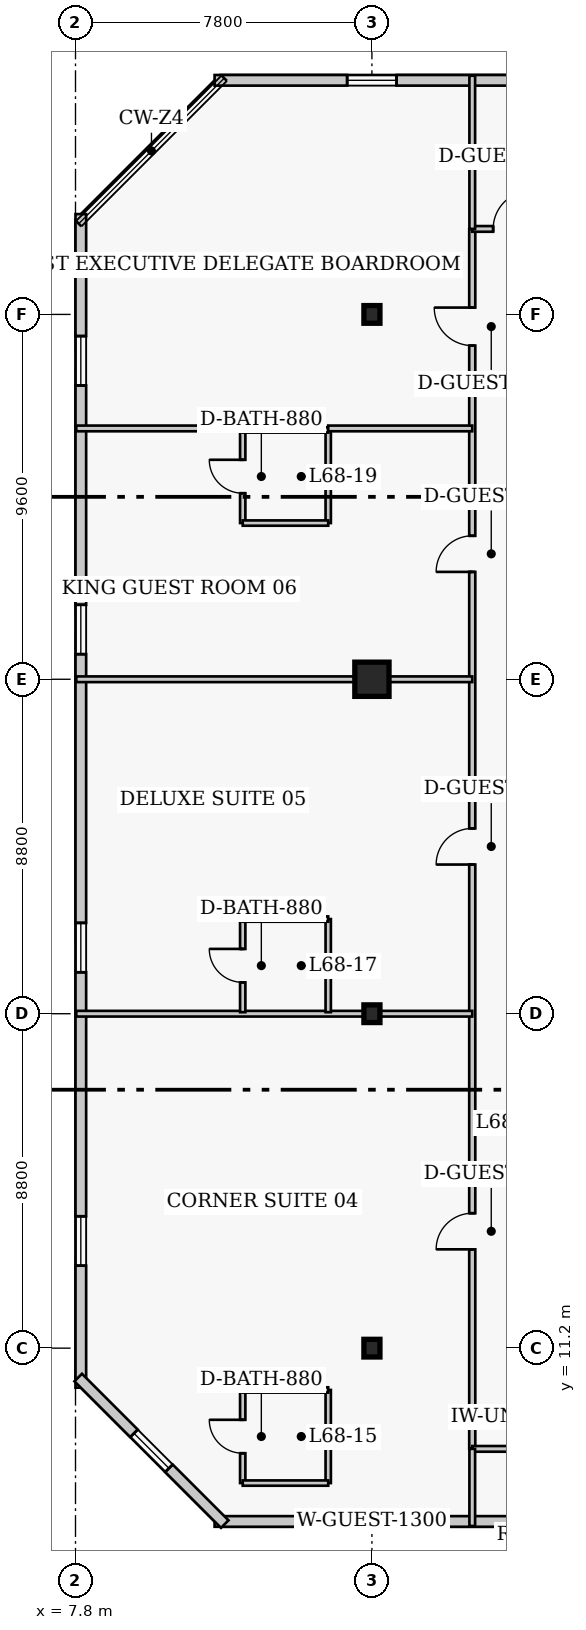
"""IFC4 building model, lengths in metres.
Left out: names, types, materials, properties, quantities, classifications, styles, units other than length and angle.
Written with IfcOpenShell. Run it as: python <this file> out.ifc"""

import sys

from ifc_helpers import new_model, si_unit, direction, frame, frame_2d, origin, origin_2d, place, context, subcontext, project, spatial, rectangle, i_section, extrude, element, fill, save


model = new_model("IFC4")
c1 = context("Model", 3, precision=1e-05, world=origin(), true_north=direction((0.0, 1.0)))
c2 = subcontext(c1, "Body", "Model", "MODEL_VIEW")
j1 = project(units=[si_unit("LENGTHUNIT", "METRE"), si_unit("PLANEANGLEUNIT", "RADIAN")], contexts=[c1])
p1 = place(None, origin())
s1 = spatial("IfcSite", under=j1, at=p1, CompositionType="ELEMENT")
p2 = place(p1, origin())
s2 = spatial("IfcBuilding", under=s1, at=p2, CompositionType="ELEMENT")
p3 = place(p2, frame((0.0, 0.0, 273.4)))
s3 = spatial("IfcBuildingStorey", under=s2, at=p3, CompositionType="ELEMENT", Elevation=273.4)
for number, where, z_axis, x_axis in (
    (1, (15.6, 11.2, 0.0), (0.0, 0.0, 1.0), (1.0, 0.0, 0.0)),
    (2, (15.6, 20.0, 0.0), (0.0, 0.0, 1.0), (1.0, 0.0, 0.0)),
):
    element("IfcColumn", number, at=place(p3, frame(where, z_axis=z_axis, x_axis=x_axis)), inside=s3, PredefinedType="COLUMN", context=c2, shape_type="SweptSolid", body=[
        extrude(i_section(OverallWidth=0.422, OverallDepth=0.465, WebThickness=0.045, FlangeThickness=0.073, FilletRadius=0.017, at=origin_2d()), origin(), (0.0, 0.0, 1.0), 4.0),
    ])
p4 = place(p3, frame((15.6, 28.8, 0.0), z_axis=(0.0, 0.0, 1.0), x_axis=(1.0, 0.0, 0.0)))
e3 = element("IfcColumn", 3, at=p4, inside=s3, PredefinedType="COLUMN", context=c2, shape_type="SweptSolid", body=[
    extrude(rectangle(XDim=0.9, YDim=0.9, at=origin_2d()), origin(), (0.0, 0.0, 1.0), 4.0),
])
p5 = place(p3, frame((15.6, 38.4, 0.0), z_axis=(0.0, 0.0, 1.0), x_axis=(1.0, 0.0, 0.0)))
e4 = element("IfcColumn", 4, at=p5, inside=s3, PredefinedType="COLUMN", context=c2, shape_type="SweptSolid", body=[
    extrude(i_section(OverallWidth=0.422, OverallDepth=0.465, WebThickness=0.045, FlangeThickness=0.073, FilletRadius=0.017, at=origin_2d()), origin(), (0.0, 0.0, 1.0), 4.0),
])
p6 = place(p3, frame((11.46, 6.64, 0.0), z_axis=(0.0, 0.0, 1.0), x_axis=(1.0, 0.0, 0.0)))
e5 = element("IfcWall", 5, at=p6, inside=s3, PredefinedType="SOLIDWALL", context=c2, shape_type="SweptSolid", body=[
    extrude(rectangle(XDim=24.83, YDim=0.28, at=frame_2d((12.415, 0.0))), origin(), (0.0, 0.0, 1.0), 3.76),
])
p7 = place(p6, frame((15.14, 0.0, 0.0)))
e6 = element("IfcOpeningElement", 6, at=p7, cuts=e5, PredefinedType="OPENING", context=c2, shape_type="SweptSolid", body=[
    extrude(rectangle(XDim=1.4, YDim=2.15, at=frame_2d((0.7, 1.075))), frame((0.0, 0.15, 0.0), z_axis=(0.0, -1.0, 0.0), x_axis=(1.0, 0.0, 0.0)), (0.0, 0.0, 1.0), 0.3),
])
p8 = place(p6, frame((3.488, 0.0, 0.85)))
e7 = element("IfcOpeningElement", 7, at=p8, cuts=e5, PredefinedType="OPENING", context=c2, shape_type="SweptSolid", body=[
    extrude(rectangle(XDim=1.3, YDim=1.7, at=frame_2d((0.65, 0.85))), frame((0.0, 0.15, 0.0), z_axis=(0.0, -1.0, 0.0), x_axis=(1.0, 0.0, 0.0)), (0.0, 0.0, 1.0), 0.3),
])
p9 = place(p6, frame((12.915, 0.0, 0.85)))
e8 = element("IfcOpeningElement", 8, at=p9, cuts=e5, PredefinedType="OPENING", context=c2, shape_type="SweptSolid", body=[
    extrude(rectangle(XDim=1.3, YDim=1.7, at=frame_2d((0.65, 0.85))), frame((0.0, 0.15, 0.0), z_axis=(0.0, -1.0, 0.0), x_axis=(1.0, 0.0, 0.0)), (0.0, 0.0, 1.0), 0.3),
])
p10 = place(p6, frame((20.692, 0.0, 0.85)))
e9 = element("IfcOpeningElement", 9, at=p10, cuts=e5, PredefinedType="OPENING", context=c2, shape_type="SweptSolid", body=[
    extrude(rectangle(XDim=1.3, YDim=1.7, at=frame_2d((0.65, 0.85))), frame((0.0, 0.15, 0.0), z_axis=(0.0, -1.0, 0.0), x_axis=(1.0, 0.0, 0.0)), (0.0, 0.0, 1.0), 0.3),
])
p11 = place(p3, frame((36.29, 44.56, 0.0), z_axis=(0.0, 0.0, 1.0), x_axis=(-1.0, 0.0, 0.0)))
e10 = element("IfcWall", 10, at=p11, inside=s3, PredefinedType="SOLIDWALL", context=c2, shape_type="SweptSolid", body=[
    extrude(rectangle(XDim=24.83, YDim=0.28, at=frame_2d((12.415, 0.0))), origin(), (0.0, 0.0, 1.0), 3.76),
])
p12 = place(p11, frame((3.488, 0.0, 0.85)))
e11 = element("IfcOpeningElement", 11, at=p12, cuts=e10, PredefinedType="OPENING", context=c2, shape_type="SweptSolid", body=[
    extrude(rectangle(XDim=1.3, YDim=1.7, at=frame_2d((0.65, 0.85))), frame((0.0, 0.15, 0.0), z_axis=(0.0, -1.0, 0.0), x_axis=(1.0, 0.0, 0.0)), (0.0, 0.0, 1.0), 0.3),
])
p13 = place(p11, frame((11.765, 0.0, 0.85)))
e12 = element("IfcOpeningElement", 12, at=p13, cuts=e10, PredefinedType="OPENING", context=c2, shape_type="SweptSolid", body=[
    extrude(rectangle(XDim=1.3, YDim=1.7, at=frame_2d((0.65, 0.85))), frame((0.0, 0.15, 0.0), z_axis=(0.0, -1.0, 0.0), x_axis=(1.0, 0.0, 0.0)), (0.0, 0.0, 1.0), 0.3),
])
p14 = place(p11, frame((20.042, 0.0, 0.85)))
e13 = element("IfcOpeningElement", 13, at=p14, cuts=e10, PredefinedType="OPENING", context=c2, shape_type="SweptSolid", body=[
    extrude(rectangle(XDim=1.3, YDim=1.7, at=frame_2d((0.65, 0.85))), frame((0.0, 0.15, 0.0), z_axis=(0.0, -1.0, 0.0), x_axis=(1.0, 0.0, 0.0)), (0.0, 0.0, 1.0), 0.3),
])
p15 = place(p3, frame((7.94, 41.04, 0.0), z_axis=(0.0, 0.0, 1.0), x_axis=(0.0, -1.0, 0.0)))
e14 = element("IfcWall", 14, at=p15, inside=s3, PredefinedType="SOLIDWALL", context=c2, shape_type="SweptSolid", body=[
    extrude(rectangle(XDim=30.88, YDim=0.28, at=frame_2d((15.44, 0.0))), origin(), (0.0, 0.0, 1.0), 3.76),
])
p16 = place(p15, frame((3.21, 0.0, 0.85)))
e15 = element("IfcOpeningElement", 15, at=p16, cuts=e14, PredefinedType="OPENING", context=c2, shape_type="SweptSolid", body=[
    extrude(rectangle(XDim=1.3, YDim=1.7, at=frame_2d((0.65, 0.85))), frame((0.0, 0.15, 0.0), z_axis=(0.0, -1.0, 0.0), x_axis=(1.0, 0.0, 0.0)), (0.0, 0.0, 1.0), 0.3),
])
p17 = place(p15, frame((10.28, 0.0, 0.85)))
e16 = element("IfcOpeningElement", 16, at=p17, cuts=e14, PredefinedType="OPENING", context=c2, shape_type="SweptSolid", body=[
    extrude(rectangle(XDim=1.3, YDim=1.7, at=frame_2d((0.65, 0.85))), frame((0.0, 0.15, 0.0), z_axis=(0.0, -1.0, 0.0), x_axis=(1.0, 0.0, 0.0)), (0.0, 0.0, 1.0), 0.3),
])
p18 = place(p15, frame((18.65, 0.0, 0.85)))
e17 = element("IfcOpeningElement", 17, at=p18, cuts=e14, PredefinedType="OPENING", context=c2, shape_type="SweptSolid", body=[
    extrude(rectangle(XDim=1.3, YDim=1.7, at=frame_2d((0.65, 0.85))), frame((0.0, 0.15, 0.0), z_axis=(0.0, -1.0, 0.0), x_axis=(1.0, 0.0, 0.0)), (0.0, 0.0, 1.0), 0.3),
])
p19 = place(p15, frame((26.37, 0.0, 0.85)))
e18 = element("IfcOpeningElement", 18, at=p19, cuts=e14, PredefinedType="OPENING", context=c2, shape_type="SweptSolid", body=[
    extrude(rectangle(XDim=1.3, YDim=1.7, at=frame_2d((0.65, 0.85))), frame((0.0, 0.15, 0.0), z_axis=(0.0, -1.0, 0.0), x_axis=(1.0, 0.0, 0.0)), (0.0, 0.0, 1.0), 0.3),
])
p20 = place(p3, frame((7.871, 10.427, 0.0), z_axis=(0.0, 0.0, 1.0), x_axis=(0.707129162587, -0.707084399077, 0.0)))
e19 = element("IfcWall", 19, at=p20, inside=s3, PredefinedType="SOLIDWALL", context=c2, shape_type="SweptSolid", body=[
    extrude(rectangle(XDim=5.454, YDim=0.28, at=frame_2d((2.727, 0.0))), origin(), (0.0, 0.0, 1.0), 3.76),
])
p21 = place(p20, frame((2.077, 0.0, 0.85)))
e20 = element("IfcOpeningElement", 20, at=p21, cuts=e19, PredefinedType="OPENING", context=c2, shape_type="SweptSolid", body=[
    extrude(rectangle(XDim=1.3, YDim=1.7, at=frame_2d((0.65, 0.85))), frame((0.0, 0.15, 0.0), z_axis=(0.0, -1.0, 0.0), x_axis=(1.0, 0.0, 0.0)), (0.0, 0.0, 1.0), 0.3),
])
p22 = place(p3, frame((18.24, 8.55, 0.0), z_axis=(0.0, 0.0, 1.0), x_axis=(0.0, 1.0, 0.0)))
e21 = element("IfcWall", 21, at=p22, inside=s3, PredefinedType="PARTITIONING", context=c2, shape_type="SweptSolid", body=[
    extrude(rectangle(XDim=32.1, YDim=0.16, at=frame_2d((16.05, 0.0))), origin(), (0.0, 0.0, 1.0), 3.76),
])
p23 = place(p22, frame((5.25, 0.0, 0.0)))
e22 = element("IfcOpeningElement", 22, at=p23, cuts=e21, PredefinedType="OPENING", context=c2, shape_type="SweptSolid", body=[
    extrude(rectangle(XDim=0.95, YDim=2.1, at=frame_2d((0.475, 1.05))), frame((0.0, 0.09, 0.0), z_axis=(0.0, -1.0, 0.0), x_axis=(1.0, 0.0, 0.0)), (0.0, 0.0, 1.0), 0.18),
])
p24 = place(p22, frame((15.375, 0.0, 0.0)))
e23 = element("IfcOpeningElement", 23, at=p24, cuts=e21, PredefinedType="OPENING", context=c2, shape_type="SweptSolid", body=[
    extrude(rectangle(XDim=0.95, YDim=2.1, at=frame_2d((0.475, 1.05))), frame((0.0, 0.09, 0.0), z_axis=(0.0, -1.0, 0.0), x_axis=(1.0, 0.0, 0.0)), (0.0, 0.0, 1.0), 0.18),
])
p25 = place(p22, frame((23.075, 0.0, 0.0)))
e24 = element("IfcOpeningElement", 24, at=p25, cuts=e21, PredefinedType="OPENING", context=c2, shape_type="SweptSolid", body=[
    extrude(rectangle(XDim=0.95, YDim=2.1, at=frame_2d((0.475, 1.05))), frame((0.0, 0.09, 0.0), z_axis=(0.0, -1.0, 0.0), x_axis=(1.0, 0.0, 0.0)), (0.0, 0.0, 1.0), 0.18),
])
p26 = place(p22, frame((29.03, 0.0, 0.0)))
e25 = element("IfcOpeningElement", 25, at=p26, cuts=e21, PredefinedType="OPENING", context=c2, shape_type="SweptSolid", body=[
    extrude(rectangle(XDim=1.0, YDim=2.15, at=frame_2d((0.5, 1.075))), frame((0.0, 0.09, 0.0), z_axis=(0.0, -1.0, 0.0), x_axis=(1.0, 0.0, 0.0)), (0.0, 0.0, 1.0), 0.18),
])
p27 = place(p3, frame((18.24, 8.55, 0.0), z_axis=(0.0, 0.0, 1.0), x_axis=(1.0, 0.0, 0.0)))
e26 = element("IfcWall", 26, at=p27, inside=s3, PredefinedType="PARTITIONING", context=c2, shape_type="SweptSolid", body=[
    extrude(rectangle(XDim=2.22, YDim=0.15, at=frame_2d((1.11, 0.0))), origin(), (0.0, 0.0, 1.0), 3.76),
])
p28 = place(p3, frame((18.24, 40.65, 0.0), z_axis=(0.0, 0.0, 1.0), x_axis=(1.0, 0.0, 0.0)))
e27 = element("IfcWall", 27, at=p28, inside=s3, PredefinedType="PARTITIONING", context=c2, shape_type="SweptSolid", body=[
    extrude(rectangle(XDim=3.86, YDim=0.15, at=frame_2d((1.93, 0.0))), origin(), (0.0, 0.0, 1.0), 3.76),
])
p29 = place(p28, frame((0.55, 0.0, 0.0)))
e28 = element("IfcOpeningElement", 28, at=p29, cuts=e27, PredefinedType="OPENING", context=c2, shape_type="SweptSolid", body=[
    extrude(rectangle(XDim=1.0, YDim=2.15, at=frame_2d((0.5, 1.075))), frame((0.0, 0.085, 0.0), z_axis=(0.0, -1.0, 0.0), x_axis=(1.0, 0.0, 0.0)), (0.0, 0.0, 1.0), 0.17),
])
p30 = place(p3, frame((18.24, 40.65, 0.0), z_axis=(0.0, 0.0, 1.0), x_axis=(0.0, 1.0, 0.0)))
e29 = element("IfcWall", 29, at=p30, inside=s3, PredefinedType="PARTITIONING", context=c2, shape_type="SweptSolid", body=[
    extrude(rectangle(XDim=4.03, YDim=0.15, at=frame_2d((2.015, 0.0))), origin(), (0.0, 0.0, 1.0), 3.76),
])
p31 = place(p3, frame((18.24, 6.52, 0.0), z_axis=(0.0, 0.0, 1.0), x_axis=(0.0, 1.0, 0.0)))
e30 = element("IfcWall", 30, at=p31, inside=s3, PredefinedType="PARTITIONING", context=c2, shape_type="SweptSolid", body=[
    extrude(rectangle(XDim=2.03, YDim=0.15, at=frame_2d((1.015, 0.0))), origin(), (0.0, 0.0, 1.0), 3.76),
])
p32 = place(p3, frame((12.2, 7.65, 0.0), z_axis=(0.0, 0.0, 1.0), x_axis=(0.0, 1.0, 0.0)))
e31 = element("IfcWall", 31, at=p32, inside=s3, PredefinedType="PLUMBINGWALL", context=c2, shape_type="SweptSolid", body=[
    extrude(rectangle(XDim=2.45, YDim=0.14, at=frame_2d((1.225, 0.0))), origin(), (0.0, 0.0, 1.0), 3.76),
])
p33 = place(p32, frame((0.785, 0.0, 0.0)))
e32 = element("IfcOpeningElement", 32, at=p33, cuts=e31, PredefinedType="OPENING", context=c2, shape_type="SweptSolid", body=[
    extrude(rectangle(XDim=0.88, YDim=2.05, at=frame_2d((0.44, 1.025))), frame((0.0, 0.08, 0.0), z_axis=(0.0, -1.0, 0.0), x_axis=(1.0, 0.0, 0.0)), (0.0, 0.0, 1.0), 0.16),
])
p34 = place(p3, frame((14.45, 7.65, 0.0), z_axis=(0.0, 0.0, 1.0), x_axis=(0.0, 1.0, 0.0)))
e33 = element("IfcWall", 33, at=p34, inside=s3, PredefinedType="PLUMBINGWALL", context=c2, shape_type="SweptSolid", body=[
    extrude(rectangle(XDim=2.45, YDim=0.14, at=frame_2d((1.225, 0.0))), origin(), (0.0, 0.0, 1.0), 3.76),
])
for number, where, z_axis, x_axis in (
    (34, (12.2, 7.65, 0.0), (0.0, 0.0, 1.0), (1.0, 0.0, 0.0)),
    (35, (12.2, 10.1, 0.0), (0.0, 0.0, 1.0), (1.0, 0.0, 0.0)),
):
    element("IfcWall", number, at=place(p3, frame(where, z_axis=z_axis, x_axis=x_axis)), inside=s3, PredefinedType="PLUMBINGWALL", context=c2, shape_type="SweptSolid", body=[
        extrude(rectangle(XDim=2.25, YDim=0.14, at=frame_2d((1.125, 0.0))), origin(), (0.0, 0.0, 1.0), 3.76),
    ])
p35 = place(p3, frame((7.82, 20.0, 0.0), z_axis=(0.0, 0.0, 1.0), x_axis=(1.0, 0.0, 0.0)))
e36 = element("IfcWall", 36, at=p35, inside=s3, PredefinedType="PARTITIONING", context=c2, shape_type="SweptSolid", body=[
    extrude(rectangle(XDim=10.42, YDim=0.15, at=frame_2d((5.21, 0.0))), origin(), (0.0, 0.0, 1.0), 3.064),
])
p36 = place(p3, frame((12.2, 20.04, 0.0), z_axis=(0.0, 0.0, 1.0), x_axis=(0.0, 1.0, 0.0)))
e37 = element("IfcWall", 37, at=p36, inside=s3, PredefinedType="PLUMBINGWALL", context=c2, shape_type="SweptSolid", body=[
    extrude(rectangle(XDim=2.45, YDim=0.14, at=frame_2d((1.225, 0.0))), origin(), (0.0, 0.0, 1.0), 3.76),
])
p37 = place(p36, frame((0.785, 0.0, 0.0)))
e38 = element("IfcOpeningElement", 38, at=p37, cuts=e37, PredefinedType="OPENING", context=c2, shape_type="SweptSolid", body=[
    extrude(rectangle(XDim=0.88, YDim=2.05, at=frame_2d((0.44, 1.025))), frame((0.0, 0.08, 0.0), z_axis=(0.0, -1.0, 0.0), x_axis=(1.0, 0.0, 0.0)), (0.0, 0.0, 1.0), 0.16),
])
p38 = place(p3, frame((14.45, 20.04, 0.0), z_axis=(0.0, 0.0, 1.0), x_axis=(0.0, 1.0, 0.0)))
e39 = element("IfcWall", 39, at=p38, inside=s3, PredefinedType="PLUMBINGWALL", context=c2, shape_type="SweptSolid", body=[
    extrude(rectangle(XDim=2.45, YDim=0.14, at=frame_2d((1.225, 0.0))), origin(), (0.0, 0.0, 1.0), 3.76),
])
p39 = place(p3, frame((12.2, 22.49, 0.0), z_axis=(0.0, 0.0, 1.0), x_axis=(1.0, 0.0, 0.0)))
e40 = element("IfcWall", 40, at=p39, inside=s3, PredefinedType="PLUMBINGWALL", context=c2, shape_type="SweptSolid", body=[
    extrude(rectangle(XDim=2.25, YDim=0.14, at=frame_2d((1.125, 0.0))), origin(), (0.0, 0.0, 1.0), 3.76),
])
p40 = place(p3, frame((7.82, 28.8, 0.0), z_axis=(0.0, 0.0, 1.0), x_axis=(1.0, 0.0, 0.0)))
e41 = element("IfcWall", 41, at=p40, inside=s3, PredefinedType="PARTITIONING", context=c2, shape_type="SweptSolid", body=[
    extrude(rectangle(XDim=10.42, YDim=0.15, at=frame_2d((5.21, 0.0))), origin(), (0.0, 0.0, 1.0), 3.064),
])
p41 = place(p3, frame((12.2, 32.91, 0.0), z_axis=(0.0, 0.0, 1.0), x_axis=(0.0, 1.0, 0.0)))
e42 = element("IfcWall", 42, at=p41, inside=s3, PredefinedType="PLUMBINGWALL", context=c2, shape_type="SweptSolid", body=[
    extrude(rectangle(XDim=2.45, YDim=0.14, at=frame_2d((1.225, 0.0))), origin(), (0.0, 0.0, 1.0), 3.76),
])
p42 = place(p41, frame((0.785, 0.0, 0.0)))
e43 = element("IfcOpeningElement", 43, at=p42, cuts=e42, PredefinedType="OPENING", context=c2, shape_type="SweptSolid", body=[
    extrude(rectangle(XDim=0.88, YDim=2.05, at=frame_2d((0.44, 1.025))), frame((0.0, 0.08, 0.0), z_axis=(0.0, -1.0, 0.0), x_axis=(1.0, 0.0, 0.0)), (0.0, 0.0, 1.0), 0.16),
])
p43 = place(p3, frame((14.45, 32.91, 0.0), z_axis=(0.0, 0.0, 1.0), x_axis=(0.0, 1.0, 0.0)))
e44 = element("IfcWall", 44, at=p43, inside=s3, PredefinedType="PLUMBINGWALL", context=c2, shape_type="SweptSolid", body=[
    extrude(rectangle(XDim=2.45, YDim=0.14, at=frame_2d((1.225, 0.0))), origin(), (0.0, 0.0, 1.0), 3.76),
])
for number, where, z_axis, x_axis in (
    (45, (12.2, 32.91, 0.0), (0.0, 0.0, 1.0), (1.0, 0.0, 0.0)),
    (46, (12.2, 35.36, 0.0), (0.0, 0.0, 1.0), (1.0, 0.0, 0.0)),
):
    element("IfcWall", number, at=place(p3, frame(where, z_axis=z_axis, x_axis=x_axis)), inside=s3, PredefinedType="PLUMBINGWALL", context=c2, shape_type="SweptSolid", body=[
        extrude(rectangle(XDim=2.25, YDim=0.14, at=frame_2d((1.125, 0.0))), origin(), (0.0, 0.0, 1.0), 3.76),
    ])
p44 = place(p3, frame((7.82, 35.4, 0.0), z_axis=(0.0, 0.0, 1.0), x_axis=(1.0, 0.0, 0.0)))
e47 = element("IfcWall", 47, at=p44, inside=s3, PredefinedType="PARTITIONING", context=c2, shape_type="SweptSolid", body=[
    extrude(rectangle(XDim=4.38, YDim=0.15, at=frame_2d((2.19, 0.0))), origin(), (0.0, 0.0, 1.0), 3.76),
])
p45 = place(p3, frame((14.45, 35.4, 0.0), z_axis=(0.0, 0.0, 1.0), x_axis=(1.0, 0.0, 0.0)))
e48 = element("IfcWall", 48, at=p45, inside=s3, PredefinedType="PARTITIONING", context=c2, shape_type="SweptSolid", body=[
    extrude(rectangle(XDim=3.79, YDim=0.15, at=frame_2d((1.895, 0.0))), origin(), (0.0, 0.0, 1.0), 3.76),
])
p46 = place(p8, origin())
e49 = element("IfcWindow", 49, at=p46, inside=s3, PartitioningType="SINGLE_PANEL", PredefinedType="WINDOW", context=c2, shape_type="SweptSolid", body=[
    extrude(rectangle(XDim=1.3, YDim=1.7, at=frame_2d((0.65, 0.85))), frame((0.0, 0.03, 0.0), z_axis=(0.0, -1.0, 0.0), x_axis=(1.0, 0.0, 0.0)), (0.0, 0.0, 1.0), 0.06),
])
fill(e7, e49)
p47 = place(p14, origin())
e50 = element("IfcWindow", 50, at=p47, inside=s3, PartitioningType="SINGLE_PANEL", PredefinedType="WINDOW", context=c2, shape_type="SweptSolid", body=[
    extrude(rectangle(XDim=1.3, YDim=1.7, at=frame_2d((0.65, 0.85))), frame((0.0, 0.03, 0.0), z_axis=(0.0, -1.0, 0.0), x_axis=(1.0, 0.0, 0.0)), (0.0, 0.0, 1.0), 0.06),
])
fill(e13, e50)
p48 = place(p16, origin())
e51 = element("IfcWindow", 51, at=p48, inside=s3, PartitioningType="SINGLE_PANEL", PredefinedType="WINDOW", context=c2, shape_type="SweptSolid", body=[
    extrude(rectangle(XDim=1.3, YDim=1.7, at=frame_2d((0.65, 0.85))), frame((0.0, 0.03, 0.0), z_axis=(0.0, -1.0, 0.0), x_axis=(1.0, 0.0, 0.0)), (0.0, 0.0, 1.0), 0.06),
])
fill(e15, e51)
p49 = place(p17, origin())
e52 = element("IfcWindow", 52, at=p49, inside=s3, PartitioningType="SINGLE_PANEL", PredefinedType="WINDOW", context=c2, shape_type="SweptSolid", body=[
    extrude(rectangle(XDim=1.3, YDim=1.7, at=frame_2d((0.65, 0.85))), frame((0.0, 0.03, 0.0), z_axis=(0.0, -1.0, 0.0), x_axis=(1.0, 0.0, 0.0)), (0.0, 0.0, 1.0), 0.06),
])
fill(e16, e52)
p50 = place(p18, origin())
e53 = element("IfcWindow", 53, at=p50, inside=s3, PartitioningType="SINGLE_PANEL", PredefinedType="WINDOW", context=c2, shape_type="SweptSolid", body=[
    extrude(rectangle(XDim=1.3, YDim=1.7, at=frame_2d((0.65, 0.85))), frame((0.0, 0.03, 0.0), z_axis=(0.0, -1.0, 0.0), x_axis=(1.0, 0.0, 0.0)), (0.0, 0.0, 1.0), 0.06),
])
fill(e17, e53)
p51 = place(p19, origin())
e54 = element("IfcWindow", 54, at=p51, inside=s3, PartitioningType="SINGLE_PANEL", PredefinedType="WINDOW", context=c2, shape_type="SweptSolid", body=[
    extrude(rectangle(XDim=1.3, YDim=1.7, at=frame_2d((0.65, 0.85))), frame((0.0, 0.03, 0.0), z_axis=(0.0, -1.0, 0.0), x_axis=(1.0, 0.0, 0.0)), (0.0, 0.0, 1.0), 0.06),
])
fill(e18, e54)
p52 = place(p21, origin())
e55 = element("IfcWindow", 55, at=p52, inside=s3, PartitioningType="SINGLE_PANEL", PredefinedType="WINDOW", context=c2, shape_type="SweptSolid", body=[
    extrude(rectangle(XDim=1.3, YDim=1.7, at=frame_2d((0.65, 0.85))), frame((0.0, 0.03, 0.0), z_axis=(0.0, -1.0, 0.0), x_axis=(1.0, 0.0, 0.0)), (0.0, 0.0, 1.0), 0.06),
])
fill(e20, e55)
p53 = place(p29, origin())
e56 = element("IfcDoor", 56, at=p53, inside=s3, OperationType="SINGLE_SWING_RIGHT", PredefinedType="DOOR", context=c2, shape_type="SweptSolid", body=[
    extrude(rectangle(XDim=1.0, YDim=2.15, at=frame_2d((0.5, 1.075))), frame((0.0, 0.025, 0.0), z_axis=(0.0, -1.0, 0.0), x_axis=(1.0, 0.0, 0.0)), (0.0, 0.0, 1.0), 0.05),
])
fill(e28, e56)
p54 = place(p33, origin())
e57 = element("IfcDoor", 57, at=p54, inside=s3, OperationType="SINGLE_SWING_RIGHT", PredefinedType="DOOR", context=c2, shape_type="SweptSolid", body=[
    extrude(rectangle(XDim=0.88, YDim=2.05, at=frame_2d((0.44, 1.025))), frame((0.0, 0.025, 0.0), z_axis=(0.0, -1.0, 0.0), x_axis=(1.0, 0.0, 0.0)), (0.0, 0.0, 1.0), 0.05),
])
fill(e32, e57)
p55 = place(p23, origin())
e58 = element("IfcDoor", 58, at=p55, inside=s3, OperationType="SINGLE_SWING_LEFT", PredefinedType="DOOR", context=c2, shape_type="SweptSolid", body=[
    extrude(rectangle(XDim=0.95, YDim=2.1, at=frame_2d((0.475, 1.05))), frame((0.0, 0.025, 0.0), z_axis=(0.0, -1.0, 0.0), x_axis=(1.0, 0.0, 0.0)), (0.0, 0.0, 1.0), 0.05),
])
fill(e22, e58)
p56 = place(p37, origin())
e59 = element("IfcDoor", 59, at=p56, inside=s3, OperationType="SINGLE_SWING_RIGHT", PredefinedType="DOOR", context=c2, shape_type="SweptSolid", body=[
    extrude(rectangle(XDim=0.88, YDim=2.05, at=frame_2d((0.44, 1.025))), frame((0.0, 0.025, 0.0), z_axis=(0.0, -1.0, 0.0), x_axis=(1.0, 0.0, 0.0)), (0.0, 0.0, 1.0), 0.05),
])
fill(e38, e59)
p57 = place(p24, origin())
e60 = element("IfcDoor", 60, at=p57, inside=s3, OperationType="SINGLE_SWING_LEFT", PredefinedType="DOOR", context=c2, shape_type="SweptSolid", body=[
    extrude(rectangle(XDim=0.95, YDim=2.1, at=frame_2d((0.475, 1.05))), frame((0.0, 0.025, 0.0), z_axis=(0.0, -1.0, 0.0), x_axis=(1.0, 0.0, 0.0)), (0.0, 0.0, 1.0), 0.05),
])
fill(e23, e60)
p58 = place(p42, origin())
e61 = element("IfcDoor", 61, at=p58, inside=s3, OperationType="SINGLE_SWING_RIGHT", PredefinedType="DOOR", context=c2, shape_type="SweptSolid", body=[
    extrude(rectangle(XDim=0.88, YDim=2.05, at=frame_2d((0.44, 1.025))), frame((0.0, 0.025, 0.0), z_axis=(0.0, -1.0, 0.0), x_axis=(1.0, 0.0, 0.0)), (0.0, 0.0, 1.0), 0.05),
])
fill(e43, e61)
p59 = place(p25, origin())
e62 = element("IfcDoor", 62, at=p59, inside=s3, OperationType="SINGLE_SWING_LEFT", PredefinedType="DOOR", context=c2, shape_type="SweptSolid", body=[
    extrude(rectangle(XDim=0.95, YDim=2.1, at=frame_2d((0.475, 1.05))), frame((0.0, 0.025, 0.0), z_axis=(0.0, -1.0, 0.0), x_axis=(1.0, 0.0, 0.0)), (0.0, 0.0, 1.0), 0.05),
])
fill(e24, e62)
p60 = place(p26, origin())
e63 = element("IfcDoor", 63, at=p60, inside=s3, OperationType="SINGLE_SWING_RIGHT", PredefinedType="DOOR", context=c2, shape_type="SweptSolid", body=[
    extrude(rectangle(XDim=1.0, YDim=2.15, at=frame_2d((0.5, 1.075))), frame((0.0, 0.025, 0.0), z_axis=(0.0, -1.0, 0.0), x_axis=(1.0, 0.0, 0.0)), (0.0, 0.0, 1.0), 0.05),
])
fill(e25, e63)
save(model, sys.argv[1])
